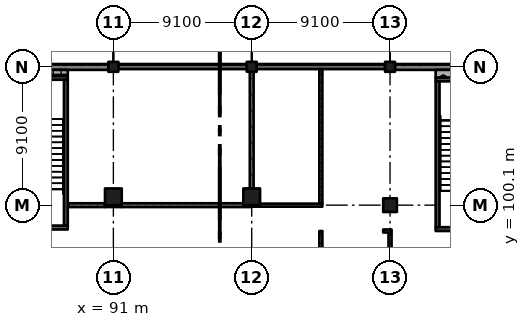
"""IFC4 building model, lengths in metres.
Left out: names, types, materials, properties, quantities, classifications, styles, units other than length and angle.
Written with IfcOpenShell. Run it as: python <this file> out.ifc"""

import sys

from ifc_helpers import new_model, si_unit, direction, frame, frame_2d, origin, origin_2d, place, context, subcontext, project, spatial, rectangle, extrude, element, fill, save


model = new_model("IFC4")
c1 = context("Model", 3, precision=1e-05, world=origin(), true_north=direction((0.0, 1.0)))
c2 = subcontext(c1, "Body", "Model", "MODEL_VIEW")
j1 = project(units=[si_unit("LENGTHUNIT", "METRE"), si_unit("PLANEANGLEUNIT", "RADIAN")], contexts=[c1])
p1 = place(None, origin())
s1 = spatial("IfcSite", under=j1, at=p1, CompositionType="ELEMENT")
p2 = place(p1, origin())
s2 = spatial("IfcBuilding", under=s1, at=p2, CompositionType="ELEMENT")
p3 = place(p2, origin())
s3 = spatial("IfcBuildingStorey", under=s2, at=p3, CompositionType="ELEMENT", Elevation=0.0)
p4 = place(p3, frame((91.0, 100.65, -0.4), z_axis=(0.0, 0.0, 1.0), x_axis=(1.0, 0.0, 0.0)))
e1 = element("IfcColumn", 1, at=p4, inside=s3, PredefinedType="COLUMN", context=c2, shape_type="SweptSolid", body=[
    extrude(rectangle(XDim=1.1, YDim=1.1, at=origin_2d()), origin(), (0.0, 0.0, 1.0), 6.77),
])
p5 = place(p3, frame((91.0, 109.2, -0.4), z_axis=(0.0, 0.0, 1.0), x_axis=(1.0, 0.0, 0.0)))
e2 = element("IfcColumn", 2, at=p5, inside=s3, PredefinedType="COLUMN", context=c2, shape_type="SweptSolid", body=[
    extrude(rectangle(XDim=0.65, YDim=0.65, at=origin_2d()), origin(), (0.0, 0.0, 1.0), 6.77),
])
p6 = place(p3, frame((100.1, 100.65, -0.4), z_axis=(0.0, 0.0, 1.0), x_axis=(1.0, 0.0, 0.0)))
e3 = element("IfcColumn", 3, at=p6, inside=s3, PredefinedType="COLUMN", context=c2, shape_type="SweptSolid", body=[
    extrude(rectangle(XDim=1.1, YDim=1.1, at=origin_2d()), origin(), (0.0, 0.0, 1.0), 6.77),
])
p7 = place(p3, frame((100.1, 109.2, -0.4), z_axis=(0.0, 0.0, 1.0), x_axis=(1.0, 0.0, 0.0)))
e4 = element("IfcColumn", 4, at=p7, inside=s3, PredefinedType="COLUMN", context=c2, shape_type="SweptSolid", body=[
    extrude(rectangle(XDim=0.65, YDim=0.65, at=origin_2d()), origin(), (0.0, 0.0, 1.0), 6.77),
])
p8 = place(p3, frame((109.2, 100.1, -0.4), z_axis=(0.0, 0.0, 1.0), x_axis=(1.0, 0.0, 0.0)))
e5 = element("IfcColumn", 5, at=p8, inside=s3, PredefinedType="COLUMN", context=c2, shape_type="SweptSolid", body=[
    extrude(rectangle(XDim=0.9, YDim=0.9, at=origin_2d()), origin(), (0.0, 0.0, 1.0), 6.77),
])
p9 = place(p3, frame((109.2, 109.2, -0.4), z_axis=(0.0, 0.0, 1.0), x_axis=(1.0, 0.0, 0.0)))
e6 = element("IfcColumn", 6, at=p9, inside=s3, PredefinedType="COLUMN", context=c2, shape_type="SweptSolid", body=[
    extrude(rectangle(XDim=0.65, YDim=0.65, at=origin_2d()), origin(), (0.0, 0.0, 1.0), 6.77),
])
p10 = place(p3, frame((117.6, 98.525, -0.4), z_axis=(0.0, 0.0, 1.0), x_axis=(-1.0, 0.0, 0.0)))
e7 = element("IfcWall", 7, at=p10, inside=s3, PredefinedType="SHEAR", context=c2, shape_type="SweptSolid", body=[
    extrude(rectangle(XDim=5.4, YDim=0.25, at=frame_2d((2.7, 0.0))), origin(), (0.0, 0.0, 1.0), 6.77),
])
p11 = place(p10, frame((1.5, 0.0, 0.4)))
e8 = element("IfcOpeningElement", 8, at=p11, cuts=e7, PredefinedType="OPENING", context=c2, shape_type="SweptSolid", body=[
    extrude(rectangle(XDim=2.4, YDim=2.1, at=frame_2d((1.2, 1.05))), frame((0.0, 0.135, 0.0), z_axis=(0.0, -1.0, 0.0), x_axis=(1.0, 0.0, 0.0)), (0.0, 0.0, 1.0), 0.27),
])
p12 = place(p3, frame((117.6, 108.375, -0.4), z_axis=(0.0, 0.0, 1.0), x_axis=(-1.0, 0.0, 0.0)))
e9 = element("IfcWall", 9, at=p12, inside=s3, PredefinedType="SHEAR", context=c2, shape_type="SweptSolid", body=[
    extrude(rectangle(XDim=5.4, YDim=0.25, at=frame_2d((2.7, 0.0))), origin(), (0.0, 0.0, 1.0), 6.77),
])
p13 = place(p3, frame((112.325, 108.25, -0.4), z_axis=(0.0, 0.0, 1.0), x_axis=(0.0, -1.0, 0.0)))
e10 = element("IfcWall", 10, at=p13, inside=s3, PredefinedType="SHEAR", context=c2, shape_type="SweptSolid", body=[
    extrude(rectangle(XDim=9.6, YDim=0.25, at=frame_2d((4.8, 0.0))), origin(), (0.0, 0.0, 1.0), 6.77),
])
p14 = place(p13, frame((7.95, 0.0, 0.4)))
e11 = element("IfcOpeningElement", 11, at=p14, cuts=e10, PredefinedType="OPENING", context=c2, shape_type="SweptSolid", body=[
    extrude(rectangle(XDim=1.2, YDim=2.1, at=frame_2d((0.6, 1.05))), frame((0.0, 0.135, 0.0), z_axis=(0.0, -1.0, 0.0), x_axis=(1.0, 0.0, 0.0)), (0.0, 0.0, 1.0), 0.27),
])
p15 = place(p3, frame((88.0, 98.625, -0.4), z_axis=(0.0, 0.0, 1.0), x_axis=(-1.0, 0.0, 0.0)))
e12 = element("IfcWall", 12, at=p15, inside=s3, PredefinedType="SHEAR", context=c2, shape_type="SweptSolid", body=[
    extrude(rectangle(XDim=5.4, YDim=0.25, at=frame_2d((2.7, 0.0))), origin(), (0.0, 0.0, 1.0), 6.77),
])
p16 = place(p15, frame((1.5, 0.0, 0.4)))
e13 = element("IfcOpeningElement", 13, at=p16, cuts=e12, PredefinedType="OPENING", context=c2, shape_type="SweptSolid", body=[
    extrude(rectangle(XDim=2.4, YDim=2.1, at=frame_2d((1.2, 1.05))), frame((0.0, 0.135, 0.0), z_axis=(0.0, -1.0, 0.0), x_axis=(1.0, 0.0, 0.0)), (0.0, 0.0, 1.0), 0.27),
])
p17 = place(p3, frame((88.0, 108.475, -0.4), z_axis=(0.0, 0.0, 1.0), x_axis=(-1.0, 0.0, 0.0)))
e14 = element("IfcWall", 14, at=p17, inside=s3, PredefinedType="SHEAR", context=c2, shape_type="SweptSolid", body=[
    extrude(rectangle(XDim=5.4, YDim=0.25, at=frame_2d((2.7, 0.0))), origin(), (0.0, 0.0, 1.0), 6.77),
])
p18 = place(p3, frame((87.875, 108.35, -0.4), z_axis=(0.0, 0.0, 1.0), x_axis=(0.0, -1.0, 0.0)))
e15 = element("IfcWall", 15, at=p18, inside=s3, PredefinedType="SHEAR", context=c2, shape_type="SweptSolid", body=[
    extrude(rectangle(XDim=9.6, YDim=0.25, at=frame_2d((4.8, 0.0))), origin(), (0.0, 0.0, 1.0), 6.77),
])
p19 = place(p3, frame((118.025, 109.175, 0.0), z_axis=(0.0, 0.0, 1.0), x_axis=(-1.0, 0.0, 0.0)))
e16 = element("IfcWall", 16, at=p19, inside=s3, PredefinedType="SOLIDWALL", context=c2, shape_type="SweptSolid", body=[
    extrude(rectangle(XDim=8.5, YDim=0.35, at=frame_2d((4.25, 0.0))), origin(), (0.0, 0.0, 1.0), 5.27),
])
p20 = place(p19, frame((5.975, 0.0, 0.0)))
e17 = element("IfcOpeningElement", 17, at=p20, cuts=e16, PredefinedType="OPENING", context=c2, shape_type="SweptSolid", body=[
    extrude(rectangle(XDim=2.1, YDim=2.4, at=frame_2d((1.05, 1.2))), frame((0.0, 0.185, 0.0), z_axis=(0.0, -1.0, 0.0), x_axis=(1.0, 0.0, 0.0)), (0.0, 0.0, 1.0), 0.37),
])
p21 = place(p3, frame((108.875, 109.2, 0.0), z_axis=(0.0, 0.0, 1.0), x_axis=(-1.0, 0.0, 0.0)))
e18 = element("IfcWall", 18, at=p21, inside=s3, PredefinedType="SOLIDWALL", context=c2, shape_type="SweptSolid", body=[
    extrude(rectangle(XDim=8.45, YDim=0.3, at=frame_2d((4.225, 0.0))), origin(), (0.0, 0.0, 1.0), 5.27),
])
p22 = place(p21, frame((1.35, 0.0, 0.0)))
e19 = element("IfcOpeningElement", 19, at=p22, cuts=e18, PredefinedType="OPENING", context=c2, shape_type="SweptSolid", body=[
    extrude(rectangle(XDim=1.8, YDim=2.4, at=frame_2d((0.9, 1.2))), frame((0.0, 0.16, 0.0), z_axis=(0.0, -1.0, 0.0), x_axis=(1.0, 0.0, 0.0)), (0.0, 0.0, 1.0), 0.32),
])
p23 = place(p21, frame((5.438, 0.0, 1.0)))
e20 = element("IfcOpeningElement", 20, at=p23, cuts=e18, PredefinedType="OPENING", context=c2, shape_type="SweptSolid", body=[
    extrude(rectangle(XDim=1.8, YDim=1.2, at=frame_2d((0.9, 0.6))), frame((0.0, 0.16, 0.0), z_axis=(0.0, -1.0, 0.0), x_axis=(1.0, 0.0, 0.0)), (0.0, 0.0, 1.0), 0.32),
])
p24 = place(p3, frame((99.775, 109.2, 0.0), z_axis=(0.0, 0.0, 1.0), x_axis=(-1.0, 0.0, 0.0)))
e21 = element("IfcWall", 21, at=p24, inside=s3, PredefinedType="SOLIDWALL", context=c2, shape_type="SweptSolid", body=[
    extrude(rectangle(XDim=8.45, YDim=0.3, at=frame_2d((4.225, 0.0))), origin(), (0.0, 0.0, 1.0), 5.27),
])
p25 = place(p24, frame((0.708, 0.0, 1.0)))
e22 = element("IfcOpeningElement", 22, at=p25, cuts=e21, PredefinedType="OPENING", context=c2, shape_type="SweptSolid", body=[
    extrude(rectangle(XDim=1.8, YDim=1.2, at=frame_2d((0.9, 0.6))), frame((0.0, 0.16, 0.0), z_axis=(0.0, -1.0, 0.0), x_axis=(1.0, 0.0, 0.0)), (0.0, 0.0, 1.0), 0.32),
])
p26 = place(p24, frame((3.325, 0.0, 1.0)))
e23 = element("IfcOpeningElement", 23, at=p26, cuts=e21, PredefinedType="OPENING", context=c2, shape_type="SweptSolid", body=[
    extrude(rectangle(XDim=1.8, YDim=1.2, at=frame_2d((0.9, 0.6))), frame((0.0, 0.16, 0.0), z_axis=(0.0, -1.0, 0.0), x_axis=(1.0, 0.0, 0.0)), (0.0, 0.0, 1.0), 0.32),
])
p27 = place(p24, frame((5.942, 0.0, 1.0)))
e24 = element("IfcOpeningElement", 24, at=p27, cuts=e21, PredefinedType="OPENING", context=c2, shape_type="SweptSolid", body=[
    extrude(rectangle(XDim=1.8, YDim=1.2, at=frame_2d((0.9, 0.6))), frame((0.0, 0.16, 0.0), z_axis=(0.0, -1.0, 0.0), x_axis=(1.0, 0.0, 0.0)), (0.0, 0.0, 1.0), 0.32),
])
p28 = place(p3, frame((90.675, 109.175, 0.0), z_axis=(0.0, 0.0, 1.0), x_axis=(-1.0, 0.0, 0.0)))
e25 = element("IfcWall", 25, at=p28, inside=s3, PredefinedType="SOLIDWALL", context=c2, shape_type="SweptSolid", body=[
    extrude(rectangle(XDim=8.475, YDim=0.35, at=frame_2d((4.238, 0.0))), origin(), (0.0, 0.0, 1.0), 5.27),
])
p29 = place(p3, frame((112.2, 108.75, 0.0), z_axis=(0.0, 0.0, 1.0), x_axis=(1.0, 0.0, 0.0)))
e26 = element("IfcWall", 26, at=p29, inside=s3, PredefinedType="SOLIDWALL", context=c2, shape_type="SweptSolid", body=[
    extrude(rectangle(XDim=5.4, YDim=0.5, at=frame_2d((2.7, 0.0))), origin(), (0.0, 0.0, 1.0), 6.37),
])
p30 = place(p3, frame((82.6, 108.8, 0.0), z_axis=(0.0, 0.0, 1.0), x_axis=(1.0, 0.0, 0.0)))
e27 = element("IfcWall", 27, at=p30, inside=s3, PredefinedType="SOLIDWALL", context=c2, shape_type="SweptSolid", body=[
    extrude(rectangle(XDim=5.4, YDim=0.4, at=frame_2d((2.7, 0.0))), origin(), (0.0, 0.0, 1.0), 6.02),
])
p31 = place(p3, frame((88.03, 100.1, 0.0), z_axis=(0.0, 0.0, 1.0), x_axis=(1.0, 0.0, 0.0)))
e28 = element("IfcWall", 28, at=p31, inside=s3, PredefinedType="SOLIDWALL", context=c2, shape_type="SweptSolid", body=[
    extrude(rectangle(XDim=2.42, YDim=0.25, at=frame_2d((1.21, 0.0))), origin(), (0.0, 0.0, 1.0), 5.57),
])
p32 = place(p3, frame((100.1, 100.1, 0.0), z_axis=(0.0, 0.0, 1.0), x_axis=(1.0, 0.0, 0.0)))
e29 = element("IfcWall", 29, at=p32, inside=s3, PredefinedType="PARTITIONING", context=c2, shape_type="SweptSolid", body=[
    extrude(rectangle(XDim=4.65, YDim=0.2, at=frame_2d((2.325, 0.0))), origin(), (0.0, 0.0, 1.0), 5.32),
])
p33 = place(p32, frame((1.85, 0.0, 0.0)))
e30 = element("IfcOpeningElement", 30, at=p33, cuts=e29, PredefinedType="OPENING", context=c2, shape_type="SweptSolid", body=[
    extrude(rectangle(XDim=1.0, YDim=2.1, at=frame_2d((0.5, 1.05))), frame((0.0, 0.11, 0.0), z_axis=(0.0, -1.0, 0.0), x_axis=(1.0, 0.0, 0.0)), (0.0, 0.0, 1.0), 0.22),
])
p34 = place(p3, frame((100.1, 108.875, 0.0), z_axis=(0.0, 0.0, 1.0), x_axis=(0.0, -1.0, 0.0)))
e31 = element("IfcWall", 31, at=p34, inside=s3, PredefinedType="SOLIDWALL", context=c2, shape_type="SweptSolid", body=[
    extrude(rectangle(XDim=7.675, YDim=0.25, at=frame_2d((3.837, 0.0))), origin(), (0.0, 0.0, 1.0), 5.37),
])
p35 = place(p3, frame((104.65, 91.1, 0.0), z_axis=(0.0, 0.0, 1.0), x_axis=(0.0, 1.0, 0.0)))
e32 = element("IfcWall", 32, at=p35, inside=s3, PredefinedType="PARTITIONING", context=c2, shape_type="SweptSolid", body=[
    extrude(rectangle(XDim=7.3, YDim=0.2, at=frame_2d((3.65, 0.0))), origin(), (0.0, 0.0, 1.0), 6.02),
])
p36 = place(p35, frame((0.95, 0.0, 0.0)))
e33 = element("IfcOpeningElement", 33, at=p36, cuts=e32, PredefinedType="OPENING", context=c2, shape_type="SweptSolid", body=[
    extrude(rectangle(XDim=1.8, YDim=2.4, at=frame_2d((0.9, 1.2))), frame((0.0, 0.11, 0.0), z_axis=(0.0, -1.0, 0.0), x_axis=(1.0, 0.0, 0.0)), (0.0, 0.0, 1.0), 0.22),
])
p37 = place(p35, frame((4.55, 0.0, 0.0)))
e34 = element("IfcOpeningElement", 34, at=p37, cuts=e32, PredefinedType="OPENING", context=c2, shape_type="SweptSolid", body=[
    extrude(rectangle(XDim=1.8, YDim=2.4, at=frame_2d((0.9, 1.2))), frame((0.0, 0.11, 0.0), z_axis=(0.0, -1.0, 0.0), x_axis=(1.0, 0.0, 0.0)), (0.0, 0.0, 1.0), 0.22),
])
p38 = place(p3, frame((104.65, 100.2, 0.0), z_axis=(0.0, 0.0, 1.0), x_axis=(0.0, 1.0, 0.0)))
e35 = element("IfcWall", 35, at=p38, inside=s3, PredefinedType="PARTITIONING", context=c2, shape_type="SweptSolid", body=[
    extrude(rectangle(XDim=8.85, YDim=0.2, at=frame_2d((4.425, 0.0))), origin(), (0.0, 0.0, 1.0), 6.02),
])
p39 = place(p3, frame((109.2, 91.475, 0.0), z_axis=(0.0, 0.0, 1.0), x_axis=(0.0, 1.0, 0.0)))
e36 = element("IfcWall", 36, at=p39, inside=s3, PredefinedType="PARTITIONING", context=c2, shape_type="SweptSolid", body=[
    extrude(rectangle(XDim=6.825, YDim=0.2, at=frame_2d((3.413, 0.0))), origin(), (0.0, 0.0, 1.0), 5.32),
])
p40 = place(p39, frame((0.85, 0.0, 0.0)))
e37 = element("IfcOpeningElement", 37, at=p40, cuts=e36, PredefinedType="OPENING", context=c2, shape_type="SweptSolid", body=[
    extrude(rectangle(XDim=1.8, YDim=2.4, at=frame_2d((0.9, 1.2))), frame((0.0, 0.11, 0.0), z_axis=(0.0, -1.0, 0.0), x_axis=(1.0, 0.0, 0.0)), (0.0, 0.0, 1.0), 0.22),
])
p41 = place(p39, frame((4.25, 0.0, 0.0)))
e38 = element("IfcOpeningElement", 38, at=p41, cuts=e36, PredefinedType="OPENING", context=c2, shape_type="SweptSolid", body=[
    extrude(rectangle(XDim=1.8, YDim=2.4, at=frame_2d((0.9, 1.2))), frame((0.0, 0.11, 0.0), z_axis=(0.0, -1.0, 0.0), x_axis=(1.0, 0.0, 0.0)), (0.0, 0.0, 1.0), 0.22),
])
p42 = place(p3, frame((109.3, 98.4, 0.0), z_axis=(0.0, 0.0, 1.0), x_axis=(-1.0, 0.0, 0.0)))
e39 = element("IfcWall", 39, at=p42, inside=s3, PredefinedType="PARTITIONING", context=c2, shape_type="SweptSolid", body=[
    extrude(rectangle(XDim=0.55, YDim=0.2, at=frame_2d((0.275, 0.0))), origin(), (0.0, 0.0, 1.0), 6.02),
])
p43 = place(p3, frame((90.45, 100.1, 0.0), z_axis=(0.0, 0.0, 1.0), x_axis=(1.0, 0.0, 0.0)))
e40 = element("IfcWall", 40, at=p43, inside=s3, PredefinedType="SOLIDWALL", context=c2, shape_type="SweptSolid", body=[
    extrude(rectangle(XDim=1.1, YDim=0.25, at=frame_2d((0.55, 0.0))), origin(), (0.0, 0.0, 1.0), 6.02),
])
p44 = place(p3, frame((91.55, 100.1, 0.0), z_axis=(0.0, 0.0, 1.0), x_axis=(1.0, 0.0, 0.0)))
e41 = element("IfcWall", 41, at=p44, inside=s3, PredefinedType="SOLIDWALL", context=c2, shape_type="SweptSolid", body=[
    extrude(rectangle(XDim=8.55, YDim=0.25, at=frame_2d((4.275, 0.0))), origin(), (0.0, 0.0, 1.0), 5.32),
])
p45 = place(p44, frame((1.63, 0.0, 0.0)))
e42 = element("IfcOpeningElement", 42, at=p45, cuts=e41, PredefinedType="OPENING", context=c2, shape_type="SweptSolid", body=[
    extrude(rectangle(XDim=1.8, YDim=2.1, at=frame_2d((0.9, 1.05))), frame((0.0, 0.135, 0.0), z_axis=(0.0, -1.0, 0.0), x_axis=(1.0, 0.0, 0.0)), (0.0, 0.0, 1.0), 0.27),
])
p46 = place(p20, frame((2.1, 0.0, 0.0), z_axis=(0.0, 0.0, 1.0), x_axis=(-1.0, 0.0, 0.0)))
e43 = element("IfcDoor", 43, at=p46, inside=s3, OperationType="DOUBLE_DOOR_SINGLE_SWING", PredefinedType="DOOR", context=c2, shape_type="SweptSolid", body=[
    extrude(rectangle(XDim=2.1, YDim=2.4, at=frame_2d((1.05, 1.2))), frame((0.0, 0.025, 0.0), z_axis=(0.0, -1.0, 0.0), x_axis=(1.0, 0.0, 0.0)), (0.0, 0.0, 1.0), 0.05),
])
fill(e17, e43)
p47 = place(p22, frame((1.8, 0.0, 0.0), z_axis=(0.0, 0.0, 1.0), x_axis=(-1.0, 0.0, 0.0)))
e44 = element("IfcDoor", 44, at=p47, inside=s3, OperationType="DOUBLE_DOOR_SINGLE_SWING", PredefinedType="DOOR", context=c2, shape_type="SweptSolid", body=[
    extrude(rectangle(XDim=1.8, YDim=2.4, at=frame_2d((0.9, 1.2))), frame((0.0, 0.025, 0.0), z_axis=(0.0, -1.0, 0.0), x_axis=(1.0, 0.0, 0.0)), (0.0, 0.0, 1.0), 0.05),
])
fill(e19, e44)
p48 = place(p23, origin())
e45 = element("IfcWindow", 45, at=p48, inside=s3, PartitioningType="SINGLE_PANEL", PredefinedType="WINDOW", context=c2, shape_type="SweptSolid", body=[
    extrude(rectangle(XDim=1.8, YDim=1.2, at=frame_2d((0.9, 0.6))), frame((0.0, 0.03, 0.0), z_axis=(0.0, -1.0, 0.0), x_axis=(1.0, 0.0, 0.0)), (0.0, 0.0, 1.0), 0.06),
])
fill(e20, e45)
p49 = place(p25, origin())
e46 = element("IfcWindow", 46, at=p49, inside=s3, PartitioningType="SINGLE_PANEL", PredefinedType="WINDOW", context=c2, shape_type="SweptSolid", body=[
    extrude(rectangle(XDim=1.8, YDim=1.2, at=frame_2d((0.9, 0.6))), frame((0.0, 0.03, 0.0), z_axis=(0.0, -1.0, 0.0), x_axis=(1.0, 0.0, 0.0)), (0.0, 0.0, 1.0), 0.06),
])
fill(e22, e46)
p50 = place(p26, origin())
e47 = element("IfcWindow", 47, at=p50, inside=s3, PartitioningType="SINGLE_PANEL", PredefinedType="WINDOW", context=c2, shape_type="SweptSolid", body=[
    extrude(rectangle(XDim=1.8, YDim=1.2, at=frame_2d((0.9, 0.6))), frame((0.0, 0.03, 0.0), z_axis=(0.0, -1.0, 0.0), x_axis=(1.0, 0.0, 0.0)), (0.0, 0.0, 1.0), 0.06),
])
fill(e23, e47)
p51 = place(p27, origin())
e48 = element("IfcWindow", 48, at=p51, inside=s3, PartitioningType="SINGLE_PANEL", PredefinedType="WINDOW", context=c2, shape_type="SweptSolid", body=[
    extrude(rectangle(XDim=1.8, YDim=1.2, at=frame_2d((0.9, 0.6))), frame((0.0, 0.03, 0.0), z_axis=(0.0, -1.0, 0.0), x_axis=(1.0, 0.0, 0.0)), (0.0, 0.0, 1.0), 0.06),
])
fill(e24, e48)
p52 = place(p45, origin())
e49 = element("IfcDoor", 49, at=p52, inside=s3, OperationType="DOUBLE_DOOR_SINGLE_SWING", PredefinedType="DOOR", context=c2, shape_type="SweptSolid", body=[
    extrude(rectangle(XDim=1.8, YDim=2.1, at=frame_2d((0.9, 1.05))), frame((0.0, 0.025, 0.0), z_axis=(0.0, -1.0, 0.0), x_axis=(1.0, 0.0, 0.0)), (0.0, 0.0, 1.0), 0.05),
])
fill(e42, e49)
p53 = place(p33, origin())
e50 = element("IfcDoor", 50, at=p53, inside=s3, OperationType="SINGLE_SWING_LEFT", PredefinedType="DOOR", context=c2, shape_type="SweptSolid", body=[
    extrude(rectangle(XDim=1.0, YDim=2.1, at=frame_2d((0.5, 1.05))), frame((0.0, 0.025, 0.0), z_axis=(0.0, -1.0, 0.0), x_axis=(1.0, 0.0, 0.0)), (0.0, 0.0, 1.0), 0.05),
])
fill(e30, e50)
p54 = place(p41, origin())
e51 = element("IfcDoor", 51, at=p54, inside=s3, OperationType="DOUBLE_DOOR_SINGLE_SWING", PredefinedType="DOOR", context=c2, shape_type="SweptSolid", body=[
    extrude(rectangle(XDim=1.8, YDim=2.4, at=frame_2d((0.9, 1.2))), frame((0.0, 0.025, 0.0), z_axis=(0.0, -1.0, 0.0), x_axis=(1.0, 0.0, 0.0)), (0.0, 0.0, 1.0), 0.05),
])
fill(e38, e51)
p55 = place(p37, origin())
e52 = element("IfcDoor", 52, at=p55, inside=s3, OperationType="DOUBLE_DOOR_SINGLE_SWING", PredefinedType="DOOR", context=c2, shape_type="SweptSolid", body=[
    extrude(rectangle(XDim=1.8, YDim=2.4, at=frame_2d((0.9, 1.2))), frame((0.0, 0.025, 0.0), z_axis=(0.0, -1.0, 0.0), x_axis=(1.0, 0.0, 0.0)), (0.0, 0.0, 1.0), 0.05),
])
fill(e34, e52)
p56 = place(p14, origin())
e53 = element("IfcDoor", 53, at=p56, inside=s3, OperationType="SINGLE_SWING_RIGHT", PredefinedType="DOOR", context=c2, shape_type="SweptSolid", body=[
    extrude(rectangle(XDim=1.2, YDim=2.1, at=frame_2d((0.6, 1.05))), frame((0.0, 0.025, 0.0), z_axis=(0.0, -1.0, 0.0), x_axis=(1.0, 0.0, 0.0)), (0.0, 0.0, 1.0), 0.05),
])
fill(e11, e53)
save(model, sys.argv[1])
